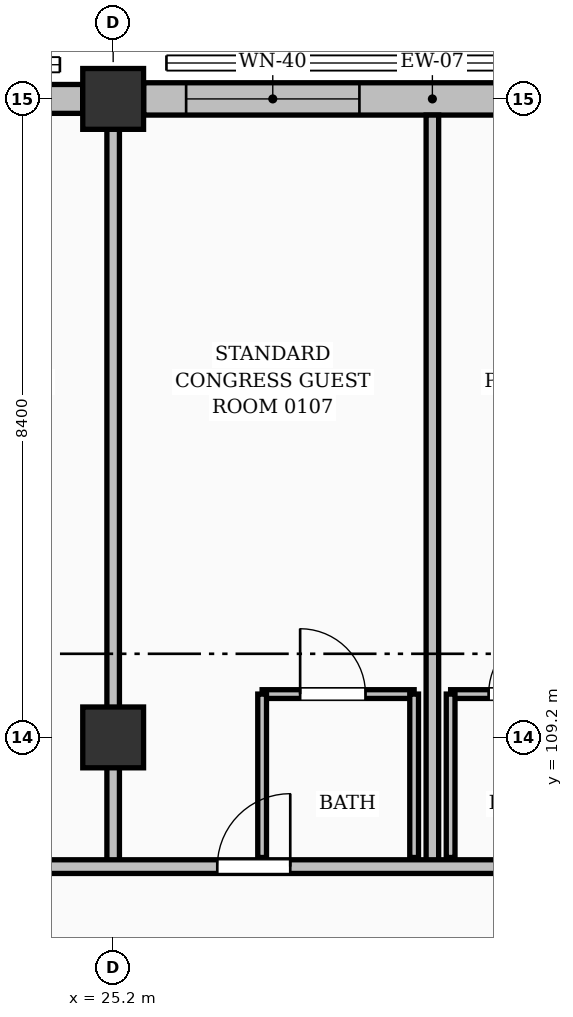
"""IFC4 building model, lengths in metres.
Left out: names, types, materials, properties, quantities, classifications, styles, units other than length and angle.
Written with IfcOpenShell. Run it as: python <this file> out.ifc"""

import sys

from ifc_helpers import new_model, si_unit, direction, frame, frame_2d, origin, origin_2d, place, context, subcontext, project, spatial, rectangle, extrude, element, fill, save


model = new_model("IFC4")
c1 = context("Model", 3, precision=1e-05, world=origin(), true_north=direction((0.0, 1.0)))
c2 = subcontext(c1, "Body", "Model", "MODEL_VIEW")
j1 = project(units=[si_unit("LENGTHUNIT", "METRE"), si_unit("PLANEANGLEUNIT", "RADIAN")], contexts=[c1])
p1 = place(None, origin())
s1 = spatial("IfcSite", under=j1, at=p1, CompositionType="ELEMENT")
p2 = place(p1, origin())
s2 = spatial("IfcBuilding", under=s1, at=p2, CompositionType="ELEMENT")
p3 = place(p2, frame((0.0, 0.0, 3.92)))
s3 = spatial("IfcBuildingStorey", under=s2, at=p3, CompositionType="ELEMENT", Elevation=3.92)
for number, where, z_axis, x_axis in (
    (1, (25.2, 109.2, 0.0), (0.0, 0.0, 1.0), (1.0, 0.0, 0.0)),
    (2, (25.2, 117.6, 0.0), (0.0, 0.0, 1.0), (1.0, 0.0, 0.0)),
):
    element("IfcColumn", number, at=place(p3, frame(where, z_axis=z_axis, x_axis=x_axis)), inside=s3, PredefinedType="COLUMN", context=c2, shape_type="SweptSolid", body=[
        extrude(rectangle(XDim=0.8, YDim=0.8, at=origin_2d()), origin(), (0.0, 0.0, 1.0), 3.64),
    ])
p4 = place(p3, frame((17.201, 117.6, 0.0), z_axis=(0.0, 0.0, 1.0), x_axis=(1.0, 0.0, 0.0)))
e3 = element("IfcWall", 3, at=p4, inside=s3, PredefinedType="SOLIDWALL", context=c2, shape_type="SweptSolid", body=[
    extrude(rectangle(XDim=7.598, YDim=0.38, at=frame_2d((3.799, 0.0))), origin(), (0.0, 0.0, 1.0), 2.445),
])
p5 = place(p4, frame((0.539, 0.0, 0.25)))
e4 = element("IfcOpeningElement", 4, at=p5, cuts=e3, PredefinedType="OPENING", context=c2, shape_type="SweptSolid", body=[
    extrude(rectangle(XDim=2.32, YDim=1.9, at=frame_2d((1.16, 0.95))), frame((0.0, 0.2, 0.0), z_axis=(0.0, -1.0, 0.0), x_axis=(1.0, 0.0, 0.0)), (0.0, 0.0, 1.0), 0.4),
])
p6 = place(p4, frame((4.759, 0.0, 0.25)))
e5 = element("IfcOpeningElement", 5, at=p6, cuts=e3, PredefinedType="OPENING", context=c2, shape_type="SweptSolid", body=[
    extrude(rectangle(XDim=2.28, YDim=2.0, at=frame_2d((1.14, 1.0))), frame((0.0, 0.2, 0.0), z_axis=(0.0, -1.0, 0.0), x_axis=(1.0, 0.0, 0.0)), (0.0, 0.0, 1.0), 0.4),
])
p7 = place(p3, frame((25.601, 117.6, 0.0), z_axis=(0.0, 0.0, 1.0), x_axis=(1.0, 0.0, 0.0)))
e6 = element("IfcWall", 6, at=p7, inside=s3, PredefinedType="SOLIDWALL", context=c2, shape_type="SweptSolid", body=[
    extrude(rectangle(XDim=7.598, YDim=0.425, at=frame_2d((3.799, 0.0))), origin(), (0.0, 0.0, 1.0), 2.445),
])
p8 = place(p7, frame((0.559, 0.0, 0.25)))
e7 = element("IfcOpeningElement", 7, at=p8, cuts=e6, PredefinedType="OPENING", context=c2, shape_type="SweptSolid", body=[
    extrude(rectangle(XDim=2.28, YDim=2.0, at=frame_2d((1.14, 1.0))), frame((0.0, 0.223, 0.0), z_axis=(0.0, -1.0, 0.0), x_axis=(1.0, 0.0, 0.0)), (0.0, 0.0, 1.0), 0.445),
])
p9 = place(p7, frame((4.774, 0.0, 0.25)))
e8 = element("IfcOpeningElement", 8, at=p9, cuts=e6, PredefinedType="OPENING", context=c2, shape_type="SweptSolid", body=[
    extrude(rectangle(XDim=2.25, YDim=1.85, at=frame_2d((1.125, 0.925))), frame((0.0, 0.223, 0.0), z_axis=(0.0, -1.0, 0.0), x_axis=(1.0, 0.0, 0.0)), (0.0, 0.0, 1.0), 0.445),
])
p10 = place(p3, frame((27.16, 109.77, 0.0), z_axis=(0.0, 0.0, 1.0), x_axis=(1.0, 0.0, 0.0)))
e9 = element("IfcWall", 9, at=p10, inside=s3, PredefinedType="PARTITIONING", context=c2, shape_type="SweptSolid", body=[
    extrude(rectangle(XDim=2.0, YDim=0.115, at=frame_2d((1.0, 0.0))), origin(), (0.0, 0.0, 1.0), 3.36),
])
p11 = place(p10, frame((0.5, 0.0, 0.0)))
e10 = element("IfcOpeningElement", 10, at=p11, cuts=e9, PredefinedType="OPENING", context=c2, shape_type="SweptSolid", body=[
    extrude(rectangle(XDim=0.86, YDim=2.05, at=frame_2d((0.43, 1.025))), frame((0.0, 0.067, 0.0), z_axis=(0.0, -1.0, 0.0), x_axis=(1.0, 0.0, 0.0)), (0.0, 0.0, 1.0), 0.135),
])
p12 = place(p3, frame((27.16, 107.62, 0.0), z_axis=(0.0, 0.0, 1.0), x_axis=(0.0, 1.0, 0.0)))
e11 = element("IfcWall", 11, at=p12, inside=s3, PredefinedType="PARTITIONING", context=c2, shape_type="SweptSolid", body=[
    extrude(rectangle(XDim=2.15, YDim=0.115, at=frame_2d((1.075, 0.0))), origin(), (0.0, 0.0, 1.0), 2.882),
])
p13 = place(p3, frame((29.16, 107.62, 0.0), z_axis=(0.0, 0.0, 1.0), x_axis=(0.0, 1.0, 0.0)))
e12 = element("IfcWall", 12, at=p13, inside=s3, PredefinedType="PARTITIONING", context=c2, shape_type="SweptSolid", body=[
    extrude(rectangle(XDim=2.15, YDim=0.115, at=frame_2d((1.075, 0.0))), origin(), (0.0, 0.0, 1.0), 3.36),
])
p14 = place(p3, frame((29.64, 109.77, 0.0), z_axis=(0.0, 0.0, 1.0), x_axis=(1.0, 0.0, 0.0)))
e13 = element("IfcWall", 13, at=p14, inside=s3, PredefinedType="PARTITIONING", context=c2, shape_type="SweptSolid", body=[
    extrude(rectangle(XDim=2.0, YDim=0.115, at=frame_2d((1.0, 0.0))), origin(), (0.0, 0.0, 1.0), 3.36),
])
p15 = place(p14, frame((0.5, 0.0, 0.0)))
e14 = element("IfcOpeningElement", 14, at=p15, cuts=e13, PredefinedType="OPENING", context=c2, shape_type="SweptSolid", body=[
    extrude(rectangle(XDim=0.86, YDim=2.05, at=frame_2d((0.43, 1.025))), frame((0.0, 0.067, 0.0), z_axis=(0.0, -1.0, 0.0), x_axis=(1.0, 0.0, 0.0)), (0.0, 0.0, 1.0), 0.135),
])
p16 = place(p3, frame((29.64, 107.62, 0.0), z_axis=(0.0, 0.0, 1.0), x_axis=(0.0, 1.0, 0.0)))
e15 = element("IfcWall", 15, at=p16, inside=s3, PredefinedType="PARTITIONING", context=c2, shape_type="SweptSolid", body=[
    extrude(rectangle(XDim=2.15, YDim=0.115, at=frame_2d((1.075, 0.0))), origin(), (0.0, 0.0, 1.0), 3.36),
])
p17 = place(p3, frame((29.4, 107.5, 0.0), z_axis=(0.0, 0.0, 1.0), x_axis=(0.0, 1.0, 0.0)))
e16 = element("IfcWall", 16, at=p17, inside=s3, PredefinedType="PARTITIONING", context=c2, shape_type="SweptSolid", body=[
    extrude(rectangle(XDim=9.887, YDim=0.165, at=frame_2d((4.944, 0.0))), origin(), (0.0, 0.0, 1.0), 3.36),
])
p18 = place(p3, frame((25.2, 107.5, 0.0), z_axis=(0.0, 0.0, 1.0), x_axis=(0.0, 1.0, 0.0)))
e17 = element("IfcWall", 17, at=p18, inside=s3, PredefinedType="PARTITIONING", context=c2, shape_type="SweptSolid", body=[
    extrude(rectangle(XDim=9.75, YDim=0.165, at=frame_2d((4.875, 0.0))), origin(), (0.0, 0.0, 1.0), 2.395),
])
p19 = place(p3, frame((0.19, 107.5, 0.0), z_axis=(0.0, 0.0, 1.0), x_axis=(1.0, 0.0, 0.0)))
e18 = element("IfcWall", 18, at=p19, inside=s3, PredefinedType="PARTITIONING", context=c2, shape_type="SweptSolid", body=[
    extrude(rectangle(XDim=34.18, YDim=0.18, at=frame_2d((17.09, 0.0))), origin(), (0.0, 0.0, 1.0), 3.36),
])
p20 = place(p19, frame((1.18, 0.0, 0.0)))
e19 = element("IfcOpeningElement", 19, at=p20, cuts=e18, PredefinedType="OPENING", context=c2, shape_type="SweptSolid", body=[
    extrude(rectangle(XDim=0.96, YDim=2.15, at=frame_2d((0.48, 1.075))), frame((0.0, 0.1, 0.0), z_axis=(0.0, -1.0, 0.0), x_axis=(1.0, 0.0, 0.0)), (0.0, 0.0, 1.0), 0.2),
])
p21 = place(p19, frame((5.84, 0.0, 0.0)))
e20 = element("IfcOpeningElement", 20, at=p21, cuts=e18, PredefinedType="OPENING", context=c2, shape_type="SweptSolid", body=[
    extrude(rectangle(XDim=0.96, YDim=2.15, at=frame_2d((0.48, 1.075))), frame((0.0, 0.1, 0.0), z_axis=(0.0, -1.0, 0.0), x_axis=(1.0, 0.0, 0.0)), (0.0, 0.0, 1.0), 0.2),
])
p22 = place(p19, frame((9.58, 0.0, 0.0)))
e21 = element("IfcOpeningElement", 21, at=p22, cuts=e18, PredefinedType="OPENING", context=c2, shape_type="SweptSolid", body=[
    extrude(rectangle(XDim=0.96, YDim=2.15, at=frame_2d((0.48, 1.075))), frame((0.0, 0.1, 0.0), z_axis=(0.0, -1.0, 0.0), x_axis=(1.0, 0.0, 0.0)), (0.0, 0.0, 1.0), 0.2),
])
p23 = place(p19, frame((14.24, 0.0, 0.0)))
e22 = element("IfcOpeningElement", 22, at=p23, cuts=e18, PredefinedType="OPENING", context=c2, shape_type="SweptSolid", body=[
    extrude(rectangle(XDim=0.96, YDim=2.15, at=frame_2d((0.48, 1.075))), frame((0.0, 0.1, 0.0), z_axis=(0.0, -1.0, 0.0), x_axis=(1.0, 0.0, 0.0)), (0.0, 0.0, 1.0), 0.2),
])
p24 = place(p19, frame((17.98, 0.0, 0.0)))
e23 = element("IfcOpeningElement", 23, at=p24, cuts=e18, PredefinedType="OPENING", context=c2, shape_type="SweptSolid", body=[
    extrude(rectangle(XDim=0.96, YDim=2.15, at=frame_2d((0.48, 1.075))), frame((0.0, 0.1, 0.0), z_axis=(0.0, -1.0, 0.0), x_axis=(1.0, 0.0, 0.0)), (0.0, 0.0, 1.0), 0.2),
])
p25 = place(p19, frame((22.64, 0.0, 0.0)))
e24 = element("IfcOpeningElement", 24, at=p25, cuts=e18, PredefinedType="OPENING", context=c2, shape_type="SweptSolid", body=[
    extrude(rectangle(XDim=0.96, YDim=2.15, at=frame_2d((0.48, 1.075))), frame((0.0, 0.1, 0.0), z_axis=(0.0, -1.0, 0.0), x_axis=(1.0, 0.0, 0.0)), (0.0, 0.0, 1.0), 0.2),
])
p26 = place(p19, frame((26.38, 0.0, 0.0)))
e25 = element("IfcOpeningElement", 25, at=p26, cuts=e18, PredefinedType="OPENING", context=c2, shape_type="SweptSolid", body=[
    extrude(rectangle(XDim=0.96, YDim=2.15, at=frame_2d((0.48, 1.075))), frame((0.0, 0.1, 0.0), z_axis=(0.0, -1.0, 0.0), x_axis=(1.0, 0.0, 0.0)), (0.0, 0.0, 1.0), 0.2),
])
p27 = place(p19, frame((31.04, 0.0, 0.0)))
e26 = element("IfcOpeningElement", 26, at=p27, cuts=e18, PredefinedType="OPENING", context=c2, shape_type="SweptSolid", body=[
    extrude(rectangle(XDim=0.96, YDim=2.15, at=frame_2d((0.48, 1.075))), frame((0.0, 0.1, 0.0), z_axis=(0.0, -1.0, 0.0), x_axis=(1.0, 0.0, 0.0)), (0.0, 0.0, 1.0), 0.2),
])
p28 = place(p8, origin())
e27 = element("IfcWindow", 27, at=p28, inside=s3, PartitioningType="DOUBLE_PANEL_VERTICAL", PredefinedType="WINDOW", context=c2, shape_type="SweptSolid", body=[
    extrude(rectangle(XDim=2.28, YDim=2.0, at=frame_2d((1.14, 1.0))), frame((0.0, 0.03, 0.0), z_axis=(0.0, -1.0, 0.0), x_axis=(1.0, 0.0, 0.0)), (0.0, 0.0, 1.0), 0.06),
])
fill(e7, e27)
p29 = place(p11, origin())
e28 = element("IfcDoor", 28, at=p29, inside=s3, OperationType="SINGLE_SWING_LEFT", PredefinedType="DOOR", context=c2, shape_type="SweptSolid", body=[
    extrude(rectangle(XDim=0.86, YDim=2.05, at=frame_2d((0.43, 1.025))), frame((0.0, 0.025, 0.0), z_axis=(0.0, -1.0, 0.0), x_axis=(1.0, 0.0, 0.0)), (0.0, 0.0, 1.0), 0.05),
])
fill(e10, e28)
p30 = place(p15, origin())
e29 = element("IfcDoor", 29, at=p30, inside=s3, OperationType="SINGLE_SWING_RIGHT", PredefinedType="DOOR", context=c2, shape_type="SweptSolid", body=[
    extrude(rectangle(XDim=0.86, YDim=2.05, at=frame_2d((0.43, 1.025))), frame((0.0, 0.025, 0.0), z_axis=(0.0, -1.0, 0.0), x_axis=(1.0, 0.0, 0.0)), (0.0, 0.0, 1.0), 0.05),
])
fill(e14, e29)
p31 = place(p26, origin())
e30 = element("IfcDoor", 30, at=p31, inside=s3, OperationType="SINGLE_SWING_RIGHT", PredefinedType="DOOR", context=c2, shape_type="SweptSolid", body=[
    extrude(rectangle(XDim=0.96, YDim=2.15, at=frame_2d((0.48, 1.075))), frame((0.0, 0.025, 0.0), z_axis=(0.0, -1.0, 0.0), x_axis=(1.0, 0.0, 0.0)), (0.0, 0.0, 1.0), 0.05),
])
fill(e25, e30)
save(model, sys.argv[1])
